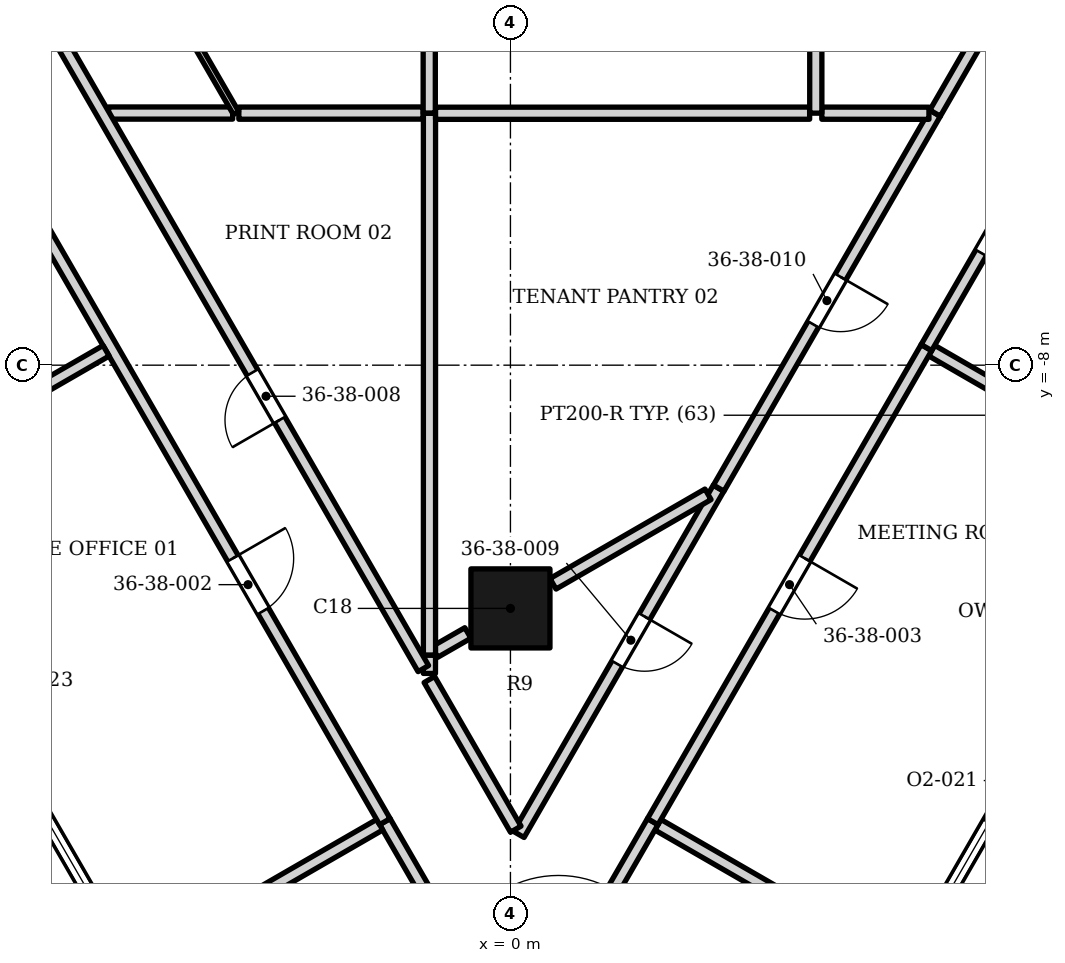
"""IFC4 building model, lengths in metres.
Left out: names, types, materials, properties, quantities, classifications, styles, units other than length and angle.
Written with IfcOpenShell. Run it as: python <this file> out.ifc"""

import sys

from ifc_helpers import new_model, si_unit, direction, frame, frame_2d, origin, origin_2d, place, context, subcontext, project, spatial, rectangle, extrude, element, fill, save


model = new_model("IFC4")
c1 = context("Model", 3, precision=1e-05, world=origin(), true_north=direction((0.0, 1.0)))
c2 = subcontext(c1, "Body", "Model", "MODEL_VIEW")
j1 = project(units=[si_unit("LENGTHUNIT", "METRE"), si_unit("PLANEANGLEUNIT", "RADIAN")], contexts=[c1])
p1 = place(None, origin())
s1 = spatial("IfcSite", under=j1, at=p1, CompositionType="ELEMENT")
p2 = place(p1, origin())
s2 = spatial("IfcBuilding", under=s1, at=p2, CompositionType="ELEMENT")
p3 = place(p2, frame((0.0, 0.0, 156.3)))
s3 = spatial("IfcBuildingStorey", under=s2, at=p3, CompositionType="ELEMENT", Elevation=156.3)
p4 = place(p3, frame((0.0, -12.0, 0.0), z_axis=(0.0, 0.0, 1.0), x_axis=(1.0, 0.0, 0.0)))
e1 = element("IfcColumn", 1, at=p4, inside=s3, PredefinedType="COLUMN", context=c2, shape_type="SweptSolid", body=[
    extrude(rectangle(XDim=1.3, YDim=1.3, at=origin_2d()), origin(), (0.0, 0.0, 1.0), 3.9),
])
p5 = place(p3, frame((-8.396, -14.138, 0.0), z_axis=(0.0, 0.0, 1.0), x_axis=(0.500027713859, -0.866009402589, 0.0)))
e2 = element("IfcWall", 2, at=p5, inside=s3, PredefinedType="ELEMENTEDWALL", context=c2, shape_type="SweptSolid", body=[
    extrude(rectangle(XDim=4.2, YDim=0.2, at=frame_2d((2.1, 0.0))), origin(), (0.0, 0.0, 1.0), 3.0),
])
p6 = place(p5, frame((0.2, 0.0, 0.45)))
e3 = element("IfcOpeningElement", 3, at=p6, cuts=e2, PredefinedType="OPENING", context=c2, shape_type="SweptSolid", body=[
    extrude(rectangle(XDim=3.8, YDim=2.25, at=frame_2d((1.9, 1.125))), frame((0.0, 0.11, 0.0), z_axis=(0.0, -1.0, 0.0), x_axis=(1.0, 0.0, 0.0)), (0.0, 0.0, 1.0), 0.22),
])
p7 = place(p3, frame((6.57, -17.775, 0.0), z_axis=(0.0, 0.0, 1.0), x_axis=(0.500027713859, 0.866009402589, 0.0)))
e4 = element("IfcWall", 4, at=p7, inside=s3, PredefinedType="ELEMENTEDWALL", context=c2, shape_type="SweptSolid", body=[
    extrude(rectangle(XDim=4.2, YDim=0.2, at=frame_2d((2.1, 0.0))), origin(), (0.0, 0.0, 1.0), 3.0),
])
p8 = place(p7, frame((0.2, 0.0, 0.45)))
e5 = element("IfcOpeningElement", 5, at=p8, cuts=e4, PredefinedType="OPENING", context=c2, shape_type="SweptSolid", body=[
    extrude(rectangle(XDim=2.4, YDim=2.25, at=frame_2d((1.2, 1.125))), frame((0.0, 0.11, 0.0), z_axis=(0.0, -1.0, 0.0), x_axis=(1.0, 0.0, 0.0)), (0.0, 0.0, 1.0), 0.22),
])
p9 = place(p7, frame((2.8, 0.0, 0.0)))
e6 = element("IfcOpeningElement", 6, at=p9, cuts=e4, PredefinedType="OPENING", context=c2, shape_type="SweptSolid", body=[
    extrude(rectangle(XDim=1.2, YDim=2.7, at=frame_2d((0.6, 1.35))), frame((0.0, 0.11, 0.0), z_axis=(0.0, -1.0, 0.0), x_axis=(1.0, 0.0, 0.0)), (0.0, 0.0, 1.0), 0.22),
])
p10 = place(p3, frame((-2.065, -15.507, 0.0), z_axis=(0.0, 0.0, 1.0), x_axis=(0.500349665943, -0.865823429916, 0.0)))
e7 = element("IfcWall", 7, at=p10, inside=s3, PredefinedType="PARTITIONING", context=c2, shape_type="SweptSolid", body=[
    extrude(rectangle(XDim=4.402, YDim=0.2, at=frame_2d((2.201, 0.0))), origin(), (0.0, 0.0, 1.0), 3.128),
])
p11 = place(p3, frame((2.425, -15.557, 0.0), z_axis=(0.0, 0.0, 1.0), x_axis=(0.866217148336, -0.499667741532, 0.0)))
e8 = element("IfcWall", 8, at=p11, inside=s3, PredefinedType="PARTITIONING", context=c2, shape_type="SweptSolid", body=[
    extrude(rectangle(XDim=4.25, YDim=0.2, at=frame_2d((2.125, 0.0))), origin(), (0.0, 0.0, 1.0), 3.052),
])
p12 = place(p3, frame((0.137, -15.717, 0.0), z_axis=(0.0, 0.0, 1.0), x_axis=(0.499742818956, 0.866173836422, 0.0)))
e9 = element("IfcWall", 9, at=p12, inside=s3, PredefinedType="PARTITIONING", context=c2, shape_type="SweptSolid", body=[
    extrude(rectangle(XDim=6.573, YDim=0.2, at=frame_2d((3.286, 0.0))), origin(), (0.0, 0.0, 1.0), 2.884),
])
p13 = place(p12, frame((3.238, 0.0, 0.0)))
e10 = element("IfcOpeningElement", 10, at=p13, cuts=e9, PredefinedType="OPENING", context=c2, shape_type="SweptSolid", body=[
    extrude(rectangle(XDim=0.9, YDim=2.1, at=frame_2d((0.45, 1.05))), frame((0.0, 0.11, 0.0), z_axis=(0.0, -1.0, 0.0), x_axis=(1.0, 0.0, 0.0)), (0.0, 0.0, 1.0), 0.22),
])
p14 = place(p3, frame((-5.831, -17.681, 0.0), z_axis=(0.0, 0.0, 1.0), x_axis=(0.866217148336, 0.499667741532, 0.0)))
e11 = element("IfcWall", 11, at=p14, inside=s3, PredefinedType="PARTITIONING", context=c2, shape_type="SweptSolid", body=[
    extrude(rectangle(XDim=4.25, YDim=0.2, at=frame_2d((2.125, 0.0))), origin(), (0.0, 0.0, 1.0), 3.052),
])
p15 = place(p3, frame((-11.065, 0.082, 0.0), z_axis=(0.0, 0.0, 1.0), x_axis=(0.499996012009, -0.86602770624, 0.0)))
e12 = element("IfcWall", 12, at=p15, inside=s3, PredefinedType="PARTITIONING", context=c2, shape_type="SweptSolid", body=[
    extrude(rectangle(XDim=18.0, YDim=0.2, at=frame_2d((9.0, 0.0))), origin(), (0.0, 0.0, 1.0), 2.884),
])
p16 = place(p15, frame((4.0, 0.0, 0.0)))
e13 = element("IfcOpeningElement", 13, at=p16, cuts=e12, PredefinedType="OPENING", context=c2, shape_type="SweptSolid", body=[
    extrude(rectangle(XDim=1.0, YDim=2.1, at=frame_2d((0.5, 1.05))), frame((0.0, 0.11, 0.0), z_axis=(0.0, -1.0, 0.0), x_axis=(1.0, 0.0, 0.0)), (0.0, 0.0, 1.0), 0.22),
])
p17 = place(p15, frame((13.0, 0.0, 0.0)))
e14 = element("IfcOpeningElement", 14, at=p17, cuts=e12, PredefinedType="OPENING", context=c2, shape_type="SweptSolid", body=[
    extrude(rectangle(XDim=1.0, YDim=2.4, at=frame_2d((0.5, 1.2))), frame((0.0, 0.11, 0.0), z_axis=(0.0, -1.0, 0.0), x_axis=(1.0, 0.0, 0.0)), (0.0, 0.0, 1.0), 0.22),
])
p18 = place(p3, frame((0.188, -19.231, 0.0), z_axis=(0.0, 0.0, 1.0), x_axis=(0.500313526201, 0.865844313662, 0.0)))
e15 = element("IfcWall", 15, at=p18, inside=s3, PredefinedType="PARTITIONING", context=c2, shape_type="SweptSolid", body=[
    extrude(rectangle(XDim=4.302, YDim=0.2, at=frame_2d((2.151, 0.0))), origin(), (0.0, 0.0, 1.0), 3.128),
])
p19 = place(p18, frame((1.201, 0.0, 0.0)))
e16 = element("IfcOpeningElement", 16, at=p19, cuts=e15, PredefinedType="OPENING", context=c2, shape_type="SweptSolid", body=[
    extrude(rectangle(XDim=1.8, YDim=2.4, at=frame_2d((0.9, 1.2))), frame((0.0, 0.11, 0.0), z_axis=(0.0, -1.0, 0.0), x_axis=(1.0, 0.0, 0.0)), (0.0, 0.0, 1.0), 0.22),
])
p20 = place(p3, frame((-1.333, -13.169, 0.0), z_axis=(0.0, 0.0, 1.0), x_axis=(0.499982728352, -0.866035375346, 0.0)))
e17 = element("IfcWall", 17, at=p20, inside=s3, PredefinedType="PARTITIONING", context=c2, shape_type="SweptSolid", body=[
    extrude(rectangle(XDim=2.842, YDim=0.2, at=frame_2d((1.421, 0.0))), origin(), (0.0, 0.0, 1.0), 3.128),
])
p21 = place(p3, frame((-1.333, -13.07, 0.0), z_axis=(0.0, 0.0, 1.0), x_axis=(0.004870072116, 0.999988141128, 0.0)))
e18 = element("IfcWall", 18, at=p21, inside=s3, PredefinedType="PARTITIONING", context=c2, shape_type="SweptSolid", body=[
    extrude(rectangle(XDim=0.301, YDim=0.2, at=frame_2d((0.15, 0.0))), origin(), (0.0, 0.0, 1.0), 3.73),
])
p22 = place(p3, frame((-1.245, -12.717, 0.0), z_axis=(0.0, 0.0, 1.0), x_axis=(0.867141243483, 0.498062309205, 0.0)))
e19 = element("IfcWall", 19, at=p22, inside=s3, PredefinedType="PARTITIONING", context=c2, shape_type="SweptSolid", body=[
    extrude(rectangle(XDim=0.628, YDim=0.2, at=frame_2d((0.314, 0.0))), origin(), (0.0, 0.0, 1.0), 3.73),
])
p23 = place(p3, frame((0.7, -11.596, 0.0), z_axis=(0.0, 0.0, 1.0), x_axis=(0.866014325049, 0.500019188443, 0.0)))
e20 = element("IfcWall", 20, at=p23, inside=s3, PredefinedType="PARTITIONING", context=c2, shape_type="SweptSolid", body=[
    extrude(rectangle(XDim=2.944, YDim=0.2, at=frame_2d((1.472, 0.0))), origin(), (0.0, 0.0, 1.0), 3.73),
])
p24 = place(p3, frame((3.426, -10.022, 0.0), z_axis=(0.0, 0.0, 1.0), x_axis=(0.499791742778, 0.866145607765, 0.0)))
e21 = element("IfcWall", 21, at=p24, inside=s3, PredefinedType="PARTITIONING", context=c2, shape_type="SweptSolid", body=[
    extrude(rectangle(XDim=7.117, YDim=0.2, at=frame_2d((3.559, 0.0))), origin(), (0.0, 0.0, 1.0), 2.884),
])
p25 = place(p24, frame((3.11, 0.0, 0.0)))
e22 = element("IfcOpeningElement", 22, at=p25, cuts=e21, PredefinedType="OPENING", context=c2, shape_type="SweptSolid", body=[
    extrude(rectangle(XDim=0.9, YDim=2.1, at=frame_2d((0.45, 1.05))), frame((0.0, 0.11, 0.0), z_axis=(0.0, -1.0, 0.0), x_axis=(1.0, 0.0, 0.0)), (0.0, 0.0, 1.0), 0.22),
])
p26 = place(p3, frame((-10.331, -9.886, 0.0), z_axis=(0.0, 0.0, 1.0), x_axis=(0.866245832331, 0.499618012055, 0.0)))
e23 = element("IfcWall", 23, at=p26, inside=s3, PredefinedType="PARTITIONING", context=c2, shape_type="SweptSolid", body=[
    extrude(rectangle(XDim=4.25, YDim=0.2, at=frame_2d((2.125, 0.0))), origin(), (0.0, 0.0, 1.0), 3.052),
])
p27 = place(p3, frame((6.928, -7.76, 0.0), z_axis=(0.0, 0.0, 1.0), x_axis=(0.86582081126, -0.500354197333, 0.0)))
e24 = element("IfcWall", 24, at=p27, inside=s3, PredefinedType="PARTITIONING", context=c2, shape_type="SweptSolid", body=[
    extrude(rectangle(XDim=4.248, YDim=0.2, at=frame_2d((2.124, 0.0))), origin(), (0.0, 0.0, 1.0), 3.052),
])
p28 = place(p3, frame((2.34, -15.506, 0.0), z_axis=(0.0, 0.0, 1.0), x_axis=(0.5000018851, 0.866024315419, 0.0)))
e25 = element("IfcWall", 25, at=p28, inside=s3, PredefinedType="PARTITIONING", context=c2, shape_type="SweptSolid", body=[
    extrude(rectangle(XDim=9.0, YDim=0.2, at=frame_2d((4.5, 0.0))), origin(), (0.0, 0.0, 1.0), 2.884),
])
p29 = place(p28, frame((4.0, 0.0, 0.0)))
e26 = element("IfcOpeningElement", 26, at=p29, cuts=e25, PredefinedType="OPENING", context=c2, shape_type="SweptSolid", body=[
    extrude(rectangle(XDim=1.0, YDim=2.1, at=frame_2d((0.5, 1.05))), frame((0.0, 0.11, 0.0), z_axis=(0.0, -1.0, 0.0), x_axis=(1.0, 0.0, 0.0)), (0.0, 0.0, 1.0), 0.22),
])
p30 = place(p3, frame((-4.467, -3.855, 0.0), z_axis=(0.0, 0.0, 1.0), x_axis=(0.999999841097, 0.000563743166, 0.0)))
e27 = element("IfcWall", 27, at=p30, inside=s3, PredefinedType="PARTITIONING", context=c2, shape_type="SweptSolid", body=[
    extrude(rectangle(XDim=3.031, YDim=0.2, at=frame_2d((1.516, 0.0))), origin(), (0.0, 0.0, 1.0), 3.73),
])
p31 = place(p3, frame((-1.332, -12.767, 0.0), z_axis=(0.0, 0.0, 1.0), x_axis=(0.0, 1.0, 0.0)))
e28 = element("IfcWall", 28, at=p31, inside=s3, PredefinedType="PARTITIONING", context=c2, shape_type="SweptSolid", body=[
    extrude(rectangle(XDim=8.909, YDim=0.2, at=frame_2d((4.455, 0.0))), origin(), (0.0, 0.0, 1.0), 2.95),
])
p32 = place(p3, frame((-1.232, -3.857, 0.0), z_axis=(0.0, 0.0, 1.0), x_axis=(0.999999961423, 0.000277766745, 0.0)))
e29 = element("IfcWall", 29, at=p32, inside=s3, PredefinedType="PARTITIONING", context=c2, shape_type="SweptSolid", body=[
    extrude(rectangle(XDim=6.153, YDim=0.2, at=frame_2d((3.076, 0.0))), origin(), (0.0, 0.0, 1.0), 3.73),
])
p33 = place(p3, frame((5.121, -3.856, 0.0), z_axis=(0.0, 0.0, 1.0), x_axis=(0.999999529486, -0.000970066062, 0.0)))
e30 = element("IfcWall", 30, at=p33, inside=s3, PredefinedType="PARTITIONING", context=c2, shape_type="SweptSolid", body=[
    extrude(rectangle(XDim=1.762, YDim=0.2, at=frame_2d((0.881, 0.0))), origin(), (0.0, 0.0, 1.0), 3.73),
])
p34 = place(p3, frame((6.984, -3.855, 0.0), z_axis=(0.0, 0.0, 1.0), x_axis=(0.500195547237, 0.865912475095, 0.0)))
e31 = element("IfcWall", 31, at=p34, inside=s3, PredefinedType="PARTITIONING", context=c2, shape_type="SweptSolid", body=[
    extrude(rectangle(XDim=8.725, YDim=0.2, at=frame_2d((4.363, 0.0))), origin(), (0.0, 0.0, 1.0), 3.052),
])
p35 = place(p34, frame((3.861, 0.0, 0.0)))
e32 = element("IfcOpeningElement", 32, at=p35, cuts=e31, PredefinedType="OPENING", context=c2, shape_type="SweptSolid", body=[
    extrude(rectangle(XDim=1.0, YDim=2.1, at=frame_2d((0.5, 1.05))), frame((0.0, 0.11, 0.0), z_axis=(0.0, -1.0, 0.0), x_axis=(1.0, 0.0, 0.0)), (0.0, 0.0, 1.0), 0.22),
])
p36 = place(p3, frame((-6.61, -3.854, 0.0), z_axis=(0.0, 0.0, 1.0), x_axis=(0.999999992849, 0.000119588614, 0.0)))
e33 = element("IfcWall", 33, at=p36, inside=s3, PredefinedType="PARTITIONING", context=c2, shape_type="SweptSolid", body=[
    extrude(rectangle(XDim=2.042, YDim=0.2, at=frame_2d((1.021, 0.0))), origin(), (0.0, 0.0, 1.0), 3.73),
])
p37 = place(p3, frame((-1.335, -3.854, 0.0), z_axis=(0.0, 0.0, 1.0), x_axis=(0.0, 1.0, 0.0)))
e34 = element("IfcWall", 34, at=p37, inside=s3, PredefinedType="PARTITIONING", context=c2, shape_type="SweptSolid", body=[
    extrude(rectangle(XDim=6.104, YDim=0.2, at=frame_2d((3.052, 0.0))), origin(), (0.0, 0.0, 1.0), 3.73),
])
p38 = place(p3, frame((6.841, -7.71, 0.0), z_axis=(0.0, 0.0, 1.0), x_axis=(0.499974615194, 0.866040059213, 0.0)))
e35 = element("IfcWall", 35, at=p38, inside=s3, PredefinedType="PARTITIONING", context=c2, shape_type="SweptSolid", body=[
    extrude(rectangle(XDim=4.498, YDim=0.2, at=frame_2d((2.249, 0.0))), origin(), (0.0, 0.0, 1.0), 3.052),
])
p39 = place(p38, frame((1.798, 0.0, 0.0)))
e36 = element("IfcOpeningElement", 36, at=p39, cuts=e35, PredefinedType="OPENING", context=c2, shape_type="SweptSolid", body=[
    extrude(rectangle(XDim=0.9, YDim=2.1, at=frame_2d((0.45, 1.05))), frame((0.0, 0.11, 0.0), z_axis=(0.0, -1.0, 0.0), x_axis=(1.0, 0.0, 0.0)), (0.0, 0.0, 1.0), 0.22),
])
p40 = place(p3, frame((-8.3, 2.697, 0.0), z_axis=(0.0, 0.0, 1.0), x_axis=(0.500524865803, -0.86572216023, 0.0)))
e37 = element("IfcWall", 37, at=p40, inside=s3, PredefinedType="PARTITIONING", context=c2, shape_type="SweptSolid", body=[
    extrude(rectangle(XDim=7.566, YDim=0.1, at=frame_2d((3.783, 0.0))), origin(), (0.0, 0.0, 1.0), 2.884),
])
p41 = place(p40, frame((0.858, 0.0, 0.0)))
e38 = element("IfcOpeningElement", 38, at=p41, cuts=e37, PredefinedType="OPENING", context=c2, shape_type="SweptSolid", body=[
    extrude(rectangle(XDim=0.9, YDim=2.1, at=frame_2d((0.45, 1.05))), frame((0.0, 0.06, 0.0), z_axis=(0.0, -1.0, 0.0), x_axis=(1.0, 0.0, 0.0)), (0.0, 0.0, 1.0), 0.12),
])
p42 = place(p40, frame((4.82, 0.0, 0.0)))
e39 = element("IfcOpeningElement", 39, at=p42, cuts=e37, PredefinedType="OPENING", context=c2, shape_type="SweptSolid", body=[
    extrude(rectangle(XDim=0.9, YDim=2.1, at=frame_2d((0.45, 1.05))), frame((0.0, 0.06, 0.0), z_axis=(0.0, -1.0, 0.0), x_axis=(1.0, 0.0, 0.0)), (0.0, 0.0, 1.0), 0.12),
])
p43 = place(p3, frame((-11.073, 3.7, 0.0), z_axis=(0.0, 0.0, 1.0), x_axis=(0.50018368245, -0.865919328697, 0.0)))
e40 = element("IfcWall", 40, at=p43, inside=s3, PredefinedType="PARTITIONING", context=c2, shape_type="SweptSolid", body=[
    extrude(rectangle(XDim=19.274, YDim=0.2, at=frame_2d((9.637, 0.0))), origin(), (0.0, 0.0, 1.0), 2.884),
])
p44 = place(p43, frame((13.651, 0.0, 0.0)))
e41 = element("IfcOpeningElement", 41, at=p44, cuts=e40, PredefinedType="OPENING", context=c2, shape_type="SweptSolid", body=[
    extrude(rectangle(XDim=0.9, YDim=2.1, at=frame_2d((0.45, 1.05))), frame((0.0, 0.11, 0.0), z_axis=(0.0, -1.0, 0.0), x_axis=(1.0, 0.0, 0.0)), (0.0, 0.0, 1.0), 0.22),
])
p45 = place(p43, frame((3.862, 0.0, 0.0)))
e42 = element("IfcOpeningElement", 42, at=p45, cuts=e40, PredefinedType="OPENING", context=c2, shape_type="SweptSolid", body=[
    extrude(rectangle(XDim=1.0, YDim=2.1, at=frame_2d((0.5, 1.05))), frame((0.0, 0.11, 0.0), z_axis=(0.0, -1.0, 0.0), x_axis=(1.0, 0.0, 0.0)), (0.0, 0.0, 1.0), 0.22),
])
p46 = place(p3, frame((5.022, -3.855, 0.0), z_axis=(0.0, 0.0, 1.0), x_axis=(0.000218538286, 0.999999976121, 0.0)))
e43 = element("IfcWall", 43, at=p46, inside=s3, PredefinedType="PARTITIONING", context=c2, shape_type="SweptSolid", body=[
    extrude(rectangle(XDim=7.82, YDim=0.2, at=frame_2d((3.91, 0.0))), origin(), (0.0, 0.0, 1.0), 3.73),
])
p47 = place(p6, origin())
e44 = element("IfcWindow", 44, at=p47, inside=s3, PartitioningType="SINGLE_PANEL", PredefinedType="WINDOW", context=c2, shape_type="SweptSolid", body=[
    extrude(rectangle(XDim=3.8, YDim=2.25, at=frame_2d((1.9, 1.125))), frame((0.0, 0.03, 0.0), z_axis=(0.0, -1.0, 0.0), x_axis=(1.0, 0.0, 0.0)), (0.0, 0.0, 1.0), 0.06),
])
fill(e3, e44)
p48 = place(p8, origin())
e45 = element("IfcWindow", 45, at=p48, inside=s3, PartitioningType="SINGLE_PANEL", PredefinedType="WINDOW", context=c2, shape_type="SweptSolid", body=[
    extrude(rectangle(XDim=2.4, YDim=2.25, at=frame_2d((1.2, 1.125))), frame((0.0, 0.03, 0.0), z_axis=(0.0, -1.0, 0.0), x_axis=(1.0, 0.0, 0.0)), (0.0, 0.0, 1.0), 0.06),
])
fill(e5, e45)
p49 = place(p17, origin())
e46 = element("IfcDoor", 46, at=p49, inside=s3, OperationType="SINGLE_SWING_LEFT", PredefinedType="DOOR", context=c2, shape_type="SweptSolid", body=[
    extrude(rectangle(XDim=1.0, YDim=2.4, at=frame_2d((0.5, 1.2))), frame((0.0, 0.025, 0.0), z_axis=(0.0, -1.0, 0.0), x_axis=(1.0, 0.0, 0.0)), (0.0, 0.0, 1.0), 0.05),
])
fill(e14, e46)
p50 = place(p29, origin())
e47 = element("IfcDoor", 47, at=p50, inside=s3, OperationType="SINGLE_SWING_RIGHT", PredefinedType="DOOR", context=c2, shape_type="SweptSolid", body=[
    extrude(rectangle(XDim=1.0, YDim=2.1, at=frame_2d((0.5, 1.05))), frame((0.0, 0.025, 0.0), z_axis=(0.0, -1.0, 0.0), x_axis=(1.0, 0.0, 0.0)), (0.0, 0.0, 1.0), 0.05),
])
fill(e26, e47)
p51 = place(p39, origin())
e48 = element("IfcDoor", 48, at=p51, inside=s3, OperationType="SINGLE_SWING_RIGHT", PredefinedType="DOOR", context=c2, shape_type="SweptSolid", body=[
    extrude(rectangle(XDim=0.9, YDim=2.1, at=frame_2d((0.45, 1.05))), frame((0.0, 0.025, 0.0), z_axis=(0.0, -1.0, 0.0), x_axis=(1.0, 0.0, 0.0)), (0.0, 0.0, 1.0), 0.05),
])
fill(e36, e48)
p52 = place(p44, origin())
e49 = element("IfcDoor", 49, at=p52, inside=s3, OperationType="SINGLE_SWING_RIGHT", PredefinedType="DOOR", context=c2, shape_type="SweptSolid", body=[
    extrude(rectangle(XDim=0.9, YDim=2.1, at=frame_2d((0.45, 1.05))), frame((0.0, 0.025, 0.0), z_axis=(0.0, -1.0, 0.0), x_axis=(1.0, 0.0, 0.0)), (0.0, 0.0, 1.0), 0.05),
])
fill(e41, e49)
p53 = place(p13, origin())
e50 = element("IfcDoor", 50, at=p53, inside=s3, OperationType="SINGLE_SWING_RIGHT", PredefinedType="DOOR", context=c2, shape_type="SweptSolid", body=[
    extrude(rectangle(XDim=0.9, YDim=2.1, at=frame_2d((0.45, 1.05))), frame((0.0, 0.025, 0.0), z_axis=(0.0, -1.0, 0.0), x_axis=(1.0, 0.0, 0.0)), (0.0, 0.0, 1.0), 0.05),
])
fill(e10, e50)
p54 = place(p25, origin())
e51 = element("IfcDoor", 51, at=p54, inside=s3, OperationType="SINGLE_SWING_RIGHT", PredefinedType="DOOR", context=c2, shape_type="SweptSolid", body=[
    extrude(rectangle(XDim=0.9, YDim=2.1, at=frame_2d((0.45, 1.05))), frame((0.0, 0.025, 0.0), z_axis=(0.0, -1.0, 0.0), x_axis=(1.0, 0.0, 0.0)), (0.0, 0.0, 1.0), 0.05),
])
fill(e22, e51)
save(model, sys.argv[1])
